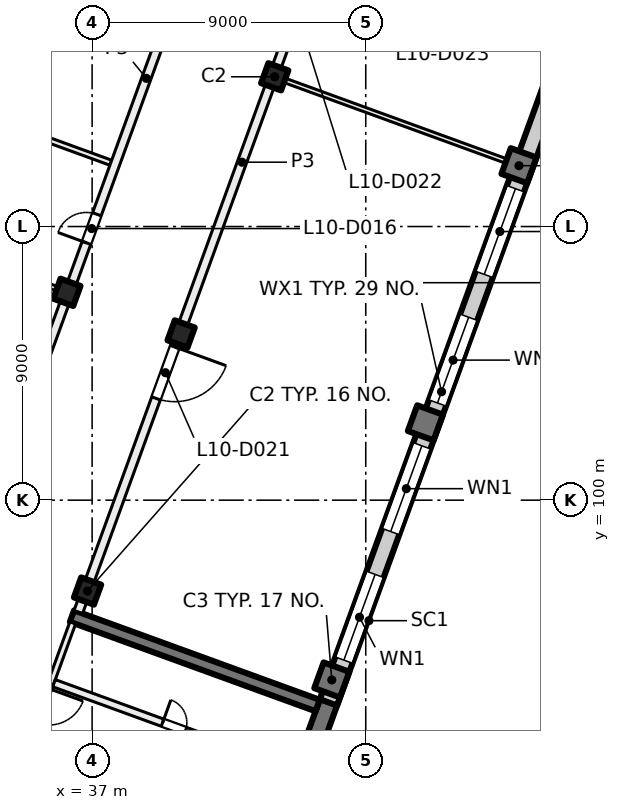
"""IFC4 building model, lengths in metres.
Left out: names, types, materials, properties, quantities, classifications, styles, units other than length and angle.
Written with IfcOpenShell. Run it as: python <this file> out.ifc"""

import sys

from ifc_helpers import new_model, si_unit, direction, frame, frame_2d, origin, origin_2d, place, context, subcontext, project, spatial, rectangle, extrude, element, fill, save


model = new_model("IFC4")
c1 = context("Model", 3, precision=1e-05, world=origin(), true_north=direction((0.0, 1.0)))
c2 = subcontext(c1, "Body", "Model", "MODEL_VIEW")
j1 = project(units=[si_unit("LENGTHUNIT", "METRE"), si_unit("PLANEANGLEUNIT", "RADIAN")], contexts=[c1])
p1 = place(None, origin())
s1 = spatial("IfcSite", under=j1, at=p1, CompositionType="ELEMENT")
p2 = place(p1, origin())
s2 = spatial("IfcBuilding", under=s1, at=p2, CompositionType="ELEMENT")
p3 = place(p2, frame((0.0, 0.0, 47.5)))
s3 = spatial("IfcBuildingStorey", under=s2, at=p3, CompositionType="ELEMENT", Elevation=47.5)
for number, where, z_axis, x_axis in (
    (1, (43.006, 113.925, 0.0), (0.0, 0.0, 1.0), (-0.342, -0.94, 0.0)),
    (2, (39.927, 105.468, 0.0), (0.0, 0.0, 1.0), (-0.342, -0.94, 0.0)),
    (3, (36.849, 97.011, 0.0), (0.0, 0.0, 1.0), (-0.342, -0.94, 0.0)),
    (4, (36.169, 106.836, 0.0), (0.0, 0.0, 1.0), (-0.342, -0.94, 0.0)),
):
    element("IfcColumn", number, at=place(p3, frame(where, z_axis=z_axis, x_axis=x_axis)), inside=s3, PredefinedType="COLUMN", context=c2, shape_type="SweptSolid", body=[
        extrude(rectangle(XDim=0.7, YDim=0.7, at=origin_2d()), origin(), (0.0, 0.0, 1.0), 4.0),
    ])
for number, where, z_axis, x_axis in (
    (5, (51.04, 111.001, 0.0), (0.0, 0.0, 1.0), (-0.342, -0.94, 0.0)),
    (6, (47.962, 102.544, 0.0), (0.0, 0.0, 1.0), (-0.342, -0.94, 0.0)),
    (7, (44.884, 94.087, 0.0), (0.0, 0.0, 1.0), (-0.342, -0.94, 0.0)),
):
    element("IfcColumn", number, at=place(p3, frame(where, z_axis=z_axis, x_axis=x_axis)), inside=s3, PredefinedType="COLUMN", context=c2, shape_type="SweptSolid", body=[
        extrude(rectangle(XDim=0.9, YDim=0.9, at=origin_2d()), origin(), (0.0, 0.0, 1.0), 4.0),
    ])
p4 = place(p3, frame((41.827, 85.249, 0.0), z_axis=(0.0, 0.0, 1.0), x_axis=(0.342016162452, 0.939694069696, 0.0)))
e8 = element("IfcWall", 8, at=p4, inside=s3, PredefinedType="SHEAR", context=c2, shape_type="SweptSolid", body=[
    extrude(rectangle(XDim=8.9, YDim=0.6, at=frame_2d((4.45, 0.0))), origin(), (0.0, 0.0, 1.0), 4.0),
])
p5 = place(p3, frame((44.418, 93.245, 0.0), z_axis=(0.0, 0.0, 1.0), x_axis=(-0.93969060187, 0.342025690201, 0.0)))
e9 = element("IfcWall", 9, at=p5, inside=s3, PredefinedType="SHEAR", context=c2, shape_type="SweptSolid", body=[
    extrude(rectangle(XDim=8.6, YDim=0.4, at=frame_2d((4.3, 0.0))), origin(), (0.0, 0.0, 1.0), 4.0),
])
p6 = place(p3, frame((52.212, 113.783, 0.0), z_axis=(0.0, 0.0, 1.0), x_axis=(-0.34202521188, -0.939690775968, 0.0)))
e10 = element("IfcWall", 10, at=p6, inside=s3, PredefinedType="SOLIDWALL", context=c2, shape_type="SweptSolid", body=[
    extrude(rectangle(XDim=21.745, YDim=0.6, at=frame_2d((10.873, 0.0))), origin(), (0.0, 0.0, 1.0), 3.625),
])
p7 = place(p6, frame((3.765, 0.0, 0.9)))
e11 = element("IfcOpeningElement", 11, at=p7, cuts=e10, PredefinedType="OPENING", context=c2, shape_type="SweptSolid", body=[
    extrude(rectangle(XDim=3.0, YDim=2.4, at=frame_2d((1.5, 1.2))), frame((0.0, 0.31, 0.0), z_axis=(0.0, -1.0, 0.0), x_axis=(1.0, 0.0, 0.0)), (0.0, 0.0, 1.0), 0.62),
])
p8 = place(p6, frame((8.265, 0.0, 0.9)))
e12 = element("IfcOpeningElement", 12, at=p8, cuts=e10, PredefinedType="OPENING", context=c2, shape_type="SweptSolid", body=[
    extrude(rectangle(XDim=3.0, YDim=2.4, at=frame_2d((1.5, 1.2))), frame((0.0, 0.31, 0.0), z_axis=(0.0, -1.0, 0.0), x_axis=(1.0, 0.0, 0.0)), (0.0, 0.0, 1.0), 0.62),
])
p9 = place(p6, frame((12.765, 0.0, 0.9)))
e13 = element("IfcOpeningElement", 13, at=p9, cuts=e10, PredefinedType="OPENING", context=c2, shape_type="SweptSolid", body=[
    extrude(rectangle(XDim=3.0, YDim=2.4, at=frame_2d((1.5, 1.2))), frame((0.0, 0.31, 0.0), z_axis=(0.0, -1.0, 0.0), x_axis=(1.0, 0.0, 0.0)), (0.0, 0.0, 1.0), 0.62),
])
p10 = place(p6, frame((17.265, 0.0, 0.9)))
e14 = element("IfcOpeningElement", 14, at=p10, cuts=e10, PredefinedType="OPENING", context=c2, shape_type="SweptSolid", body=[
    extrude(rectangle(XDim=3.0, YDim=2.4, at=frame_2d((1.5, 1.2))), frame((0.0, 0.31, 0.0), z_axis=(0.0, -1.0, 0.0), x_axis=(1.0, 0.0, 0.0)), (0.0, 0.0, 1.0), 0.62),
])
p11 = place(p3, frame((24.666, 100.669, 0.0), z_axis=(0.0, 0.0, 1.0), x_axis=(0.34201964167, 0.939692803373, 0.0)))
e15 = element("IfcWall", 15, at=p11, inside=s3, PredefinedType="SOLIDWALL", context=c2, shape_type="SweptSolid", body=[
    extrude(rectangle(XDim=32.884, YDim=0.6, at=frame_2d((16.442, 0.0))), origin(), (0.0, 0.0, 1.0), 3.625),
])
p12 = place(p11, frame((1.48, 0.0, 0.9)))
e16 = element("IfcOpeningElement", 16, at=p12, cuts=e15, PredefinedType="OPENING", context=c2, shape_type="SweptSolid", body=[
    extrude(rectangle(XDim=3.0, YDim=2.4, at=frame_2d((1.5, 1.2))), frame((0.0, 0.31, 0.0), z_axis=(0.0, -1.0, 0.0), x_axis=(1.0, 0.0, 0.0)), (0.0, 0.0, 1.0), 0.62),
])
p13 = place(p11, frame((5.98, 0.0, 0.9)))
e17 = element("IfcOpeningElement", 17, at=p13, cuts=e15, PredefinedType="OPENING", context=c2, shape_type="SweptSolid", body=[
    extrude(rectangle(XDim=3.0, YDim=2.4, at=frame_2d((1.5, 1.2))), frame((0.0, 0.31, 0.0), z_axis=(0.0, -1.0, 0.0), x_axis=(1.0, 0.0, 0.0)), (0.0, 0.0, 1.0), 0.62),
])
p14 = place(p11, frame((10.48, 0.0, 0.9)))
e18 = element("IfcOpeningElement", 18, at=p14, cuts=e15, PredefinedType="OPENING", context=c2, shape_type="SweptSolid", body=[
    extrude(rectangle(XDim=3.0, YDim=2.4, at=frame_2d((1.5, 1.2))), frame((0.0, 0.31, 0.0), z_axis=(0.0, -1.0, 0.0), x_axis=(1.0, 0.0, 0.0)), (0.0, 0.0, 1.0), 0.62),
])
p15 = place(p11, frame((14.98, 0.0, 0.9)))
e19 = element("IfcOpeningElement", 19, at=p15, cuts=e15, PredefinedType="OPENING", context=c2, shape_type="SweptSolid", body=[
    extrude(rectangle(XDim=3.0, YDim=2.4, at=frame_2d((1.5, 1.2))), frame((0.0, 0.31, 0.0), z_axis=(0.0, -1.0, 0.0), x_axis=(1.0, 0.0, 0.0)), (0.0, 0.0, 1.0), 0.62),
])
p16 = place(p11, frame((19.48, 0.0, 0.9)))
e20 = element("IfcOpeningElement", 20, at=p16, cuts=e15, PredefinedType="OPENING", context=c2, shape_type="SweptSolid", body=[
    extrude(rectangle(XDim=3.0, YDim=2.4, at=frame_2d((1.5, 1.2))), frame((0.0, 0.31, 0.0), z_axis=(0.0, -1.0, 0.0), x_axis=(1.0, 0.0, 0.0)), (0.0, 0.0, 1.0), 0.62),
])
p17 = place(p11, frame((23.98, 0.0, 0.9)))
e21 = element("IfcOpeningElement", 21, at=p17, cuts=e15, PredefinedType="OPENING", context=c2, shape_type="SweptSolid", body=[
    extrude(rectangle(XDim=3.0, YDim=2.4, at=frame_2d((1.5, 1.2))), frame((0.0, 0.31, 0.0), z_axis=(0.0, -1.0, 0.0), x_axis=(1.0, 0.0, 0.0)), (0.0, 0.0, 1.0), 0.62),
])
p18 = place(p11, frame((28.48, 0.0, 0.9)))
e22 = element("IfcOpeningElement", 22, at=p18, cuts=e15, PredefinedType="OPENING", context=c2, shape_type="SweptSolid", body=[
    extrude(rectangle(XDim=3.0, YDim=2.4, at=frame_2d((1.5, 1.2))), frame((0.0, 0.31, 0.0), z_axis=(0.0, -1.0, 0.0), x_axis=(1.0, 0.0, 0.0)), (0.0, 0.0, 1.0), 0.62),
])
p19 = place(p3, frame((36.362, 95.964, 0.0), z_axis=(0.0, 0.0, 1.0), x_axis=(-0.341995824804, -0.939701471648, 0.0)))
e23 = element("IfcWall", 23, at=p19, inside=s3, PredefinedType="PARTITIONING", context=c2, shape_type="SweptSolid", body=[
    extrude(rectangle(XDim=3.8, YDim=0.2, at=frame_2d((1.9, 0.0))), origin(), (0.0, 0.0, 1.0), 3.625),
])
p20 = place(p19, frame((2.3, 0.0, 0.0)))
e24 = element("IfcOpeningElement", 24, at=p20, cuts=e23, PredefinedType="OPENING", context=c2, shape_type="SweptSolid", body=[
    extrude(rectangle(XDim=1.2, YDim=2.1, at=frame_2d((0.6, 1.05))), frame((0.0, 0.11, 0.0), z_axis=(0.0, -1.0, 0.0), x_axis=(1.0, 0.0, 0.0)), (0.0, 0.0, 1.0), 0.22),
])
p21 = place(p3, frame((35.19, 92.453, 0.0), z_axis=(0.0, 0.0, 1.0), x_axis=(0.939691552312, -0.342023078919, 0.0)))
e25 = element("IfcWall", 25, at=p21, inside=s3, PredefinedType="PARTITIONING", context=c2, shape_type="SweptSolid", body=[
    extrude(rectangle(XDim=8.4, YDim=0.2, at=frame_2d((4.2, 0.0))), origin(), (0.0, 0.0, 1.0), 3.625),
])
p22 = place(p21, frame((5.25, 0.0, 0.0)))
e26 = element("IfcOpeningElement", 26, at=p22, cuts=e25, PredefinedType="OPENING", context=c2, shape_type="SweptSolid", body=[
    extrude(rectangle(XDim=1.5, YDim=2.1, at=frame_2d((0.75, 1.05))), frame((0.0, 0.11, 0.0), z_axis=(0.0, -1.0, 0.0), x_axis=(1.0, 0.0, 0.0)), (0.0, 0.0, 1.0), 0.22),
])
p23 = place(p3, frame((35.746, 93.98, 0.0), z_axis=(0.0, 0.0, 1.0), x_axis=(0.939691552312, -0.342023078919, 0.0)))
e27 = element("IfcWall", 27, at=p23, inside=s3, PredefinedType="PARTITIONING", context=c2, shape_type="SweptSolid", body=[
    extrude(rectangle(XDim=8.4, YDim=0.25, at=frame_2d((4.2, 0.0))), origin(), (0.0, 0.0, 1.0), 3.625),
])
p24 = place(p23, frame((3.8, 0.0, 0.0)))
e28 = element("IfcOpeningElement", 28, at=p24, cuts=e27, PredefinedType="OPENING", context=c2, shape_type="SweptSolid", body=[
    extrude(rectangle(XDim=0.8, YDim=2.1, at=frame_2d((0.4, 1.05))), frame((0.0, 0.135, 0.0), z_axis=(0.0, -1.0, 0.0), x_axis=(1.0, 0.0, 0.0)), (0.0, 0.0, 1.0), 0.27),
])
p25 = place(p3, frame((28.275, 109.709, 0.0), z_axis=(0.0, 0.0, 1.0), x_axis=(0.939697205528, -0.342007546586, 0.0)))
e29 = element("IfcWall", 29, at=p25, inside=s3, PredefinedType="PARTITIONING", context=c2, shape_type="SweptSolid", body=[
    extrude(rectangle(XDim=8.301, YDim=0.15, at=frame_2d((4.15, 0.0))), origin(), (0.0, 0.0, 1.0), 3.625),
])
p26 = place(p25, frame((5.361, 0.0, 0.0)))
e30 = element("IfcOpeningElement", 30, at=p26, cuts=e29, PredefinedType="OPENING", context=c2, shape_type="SweptSolid", body=[
    extrude(rectangle(XDim=1.8, YDim=2.1, at=frame_2d((0.9, 1.05))), frame((0.0, 0.085, 0.0), z_axis=(0.0, -1.0, 0.0), x_axis=(1.0, 0.0, 0.0)), (0.0, 0.0, 1.0), 0.17),
])
p27 = place(p3, frame((29.814, 113.938, 0.0), z_axis=(0.0, 0.0, 1.0), x_axis=(0.939697205528, -0.342007546586, 0.0)))
e31 = element("IfcWall", 31, at=p27, inside=s3, PredefinedType="PARTITIONING", context=c2, shape_type="SweptSolid", body=[
    extrude(rectangle(XDim=8.301, YDim=0.175, at=frame_2d((4.15, 0.0))), origin(), (0.0, 0.0, 1.0), 3.625),
])
p28 = place(p3, frame((32.881, 97.657, 0.0), z_axis=(0.0, 0.0, 1.0), x_axis=(0.342017360004, 0.939693633828, 0.0)))
e32 = element("IfcWall", 32, at=p28, inside=s3, PredefinedType="PARTITIONING", context=c2, shape_type="SweptSolid", body=[
    extrude(rectangle(XDim=34.516, YDim=0.3, at=frame_2d((17.258, 0.0))), origin(), (0.0, 0.0, 1.0), 3.625),
])
p29 = place(p28, frame((11.5, 0.0, 0.0)))
e33 = element("IfcOpeningElement", 33, at=p29, cuts=e32, PredefinedType="OPENING", context=c2, shape_type="SweptSolid", body=[
    extrude(rectangle(XDim=1.0, YDim=2.1, at=frame_2d((0.5, 1.05))), frame((0.0, 0.16, 0.0), z_axis=(0.0, -1.0, 0.0), x_axis=(1.0, 0.0, 0.0)), (0.0, 0.0, 1.0), 0.32),
])
p30 = place(p28, frame((20.1, 0.0, 0.0)))
e34 = element("IfcOpeningElement", 34, at=p30, cuts=e32, PredefinedType="OPENING", context=c2, shape_type="SweptSolid", body=[
    extrude(rectangle(XDim=1.8, YDim=2.1, at=frame_2d((0.9, 1.05))), frame((0.0, 0.16, 0.0), z_axis=(0.0, -1.0, 0.0), x_axis=(1.0, 0.0, 0.0)), (0.0, 0.0, 1.0), 0.32),
])
p31 = place(p3, frame((43.1, 113.891, 0.0), z_axis=(0.0, 0.0, 1.0), x_axis=(0.939670544866, -0.342080790328, 0.0)))
e35 = element("IfcWall", 35, at=p31, inside=s3, PredefinedType="PARTITIONING", context=c2, shape_type="SweptSolid", body=[
    extrude(rectangle(XDim=8.3, YDim=0.15, at=frame_2d((4.15, 0.0))), origin(), (0.0, 0.0, 1.0), 3.625),
])
p32 = place(p3, frame((47.314, 125.909, 0.0), z_axis=(0.0, 0.0, 1.0), x_axis=(-0.342010770371, -0.939696032209, 0.0)))
e36 = element("IfcWall", 36, at=p32, inside=s3, PredefinedType="PARTITIONING", context=c2, shape_type="SweptSolid", body=[
    extrude(rectangle(XDim=31.485, YDim=0.3, at=frame_2d((15.742, 0.0))), origin(), (0.0, 0.0, 1.0), 3.625),
])
p33 = place(p32, frame((22.21, 0.0, 0.0)))
e37 = element("IfcOpeningElement", 37, at=p33, cuts=e36, PredefinedType="OPENING", context=c2, shape_type="SweptSolid", body=[
    extrude(rectangle(XDim=1.8, YDim=2.1, at=frame_2d((0.9, 1.05))), frame((0.0, 0.16, 0.0), z_axis=(0.0, -1.0, 0.0), x_axis=(1.0, 0.0, 0.0)), (0.0, 0.0, 1.0), 0.32),
])
p34 = place(p32, frame((9.985, 0.0, 0.0)))
e38 = element("IfcOpeningElement", 38, at=p34, cuts=e36, PredefinedType="OPENING", context=c2, shape_type="SweptSolid", body=[
    extrude(rectangle(XDim=1.0, YDim=2.1, at=frame_2d((0.5, 1.05))), frame((0.0, 0.16, 0.0), z_axis=(0.0, -1.0, 0.0), x_axis=(1.0, 0.0, 0.0)), (0.0, 0.0, 1.0), 0.32),
])
p35 = place(p32, frame((5.484, 0.0, 0.0)))
e39 = element("IfcOpeningElement", 39, at=p35, cuts=e36, PredefinedType="OPENING", context=c2, shape_type="SweptSolid", body=[
    extrude(rectangle(XDim=1.0, YDim=2.1, at=frame_2d((0.5, 1.05))), frame((0.0, 0.16, 0.0), z_axis=(0.0, -1.0, 0.0), x_axis=(1.0, 0.0, 0.0)), (0.0, 0.0, 1.0), 0.32),
])
p36 = place(p7, origin())
e40 = element("IfcWindow", 40, at=p36, inside=s3, PartitioningType="SINGLE_PANEL", PredefinedType="WINDOW", context=c2, shape_type="SweptSolid", body=[
    extrude(rectangle(XDim=3.0, YDim=2.4, at=frame_2d((1.5, 1.2))), frame((0.0, 0.03, 0.0), z_axis=(0.0, -1.0, 0.0), x_axis=(1.0, 0.0, 0.0)), (0.0, 0.0, 1.0), 0.06),
])
fill(e11, e40)
p37 = place(p8, origin())
e41 = element("IfcWindow", 41, at=p37, inside=s3, PartitioningType="SINGLE_PANEL", PredefinedType="WINDOW", context=c2, shape_type="SweptSolid", body=[
    extrude(rectangle(XDim=3.0, YDim=2.4, at=frame_2d((1.5, 1.2))), frame((0.0, 0.03, 0.0), z_axis=(0.0, -1.0, 0.0), x_axis=(1.0, 0.0, 0.0)), (0.0, 0.0, 1.0), 0.06),
])
fill(e12, e41)
p38 = place(p9, origin())
e42 = element("IfcWindow", 42, at=p38, inside=s3, PartitioningType="SINGLE_PANEL", PredefinedType="WINDOW", context=c2, shape_type="SweptSolid", body=[
    extrude(rectangle(XDim=3.0, YDim=2.4, at=frame_2d((1.5, 1.2))), frame((0.0, 0.03, 0.0), z_axis=(0.0, -1.0, 0.0), x_axis=(1.0, 0.0, 0.0)), (0.0, 0.0, 1.0), 0.06),
])
fill(e13, e42)
p39 = place(p10, origin())
e43 = element("IfcWindow", 43, at=p39, inside=s3, PartitioningType="SINGLE_PANEL", PredefinedType="WINDOW", context=c2, shape_type="SweptSolid", body=[
    extrude(rectangle(XDim=3.0, YDim=2.4, at=frame_2d((1.5, 1.2))), frame((0.0, 0.03, 0.0), z_axis=(0.0, -1.0, 0.0), x_axis=(1.0, 0.0, 0.0)), (0.0, 0.0, 1.0), 0.06),
])
fill(e14, e43)
p40 = place(p24, origin())
e44 = element("IfcDoor", 44, at=p40, inside=s3, OperationType="SINGLE_SWING_RIGHT", PredefinedType="DOOR", context=c2, shape_type="SweptSolid", body=[
    extrude(rectangle(XDim=0.8, YDim=2.1, at=frame_2d((0.4, 1.05))), frame((0.0, 0.025, 0.0), z_axis=(0.0, -1.0, 0.0), x_axis=(1.0, 0.0, 0.0)), (0.0, 0.0, 1.0), 0.05),
])
fill(e28, e44)
p41 = place(p29, origin())
e45 = element("IfcDoor", 45, at=p41, inside=s3, OperationType="SINGLE_SWING_LEFT", PredefinedType="DOOR", context=c2, shape_type="SweptSolid", body=[
    extrude(rectangle(XDim=1.0, YDim=2.1, at=frame_2d((0.5, 1.05))), frame((0.0, 0.025, 0.0), z_axis=(0.0, -1.0, 0.0), x_axis=(1.0, 0.0, 0.0)), (0.0, 0.0, 1.0), 0.05),
])
fill(e33, e45)
p42 = place(p33, origin())
e46 = element("IfcDoor", 46, at=p42, inside=s3, OperationType="DOUBLE_DOOR_SINGLE_SWING", PredefinedType="DOOR", context=c2, shape_type="SweptSolid", body=[
    extrude(rectangle(XDim=1.8, YDim=2.1, at=frame_2d((0.9, 1.05))), frame((0.0, 0.025, 0.0), z_axis=(0.0, -1.0, 0.0), x_axis=(1.0, 0.0, 0.0)), (0.0, 0.0, 1.0), 0.05),
])
fill(e37, e46)
save(model, sys.argv[1])
